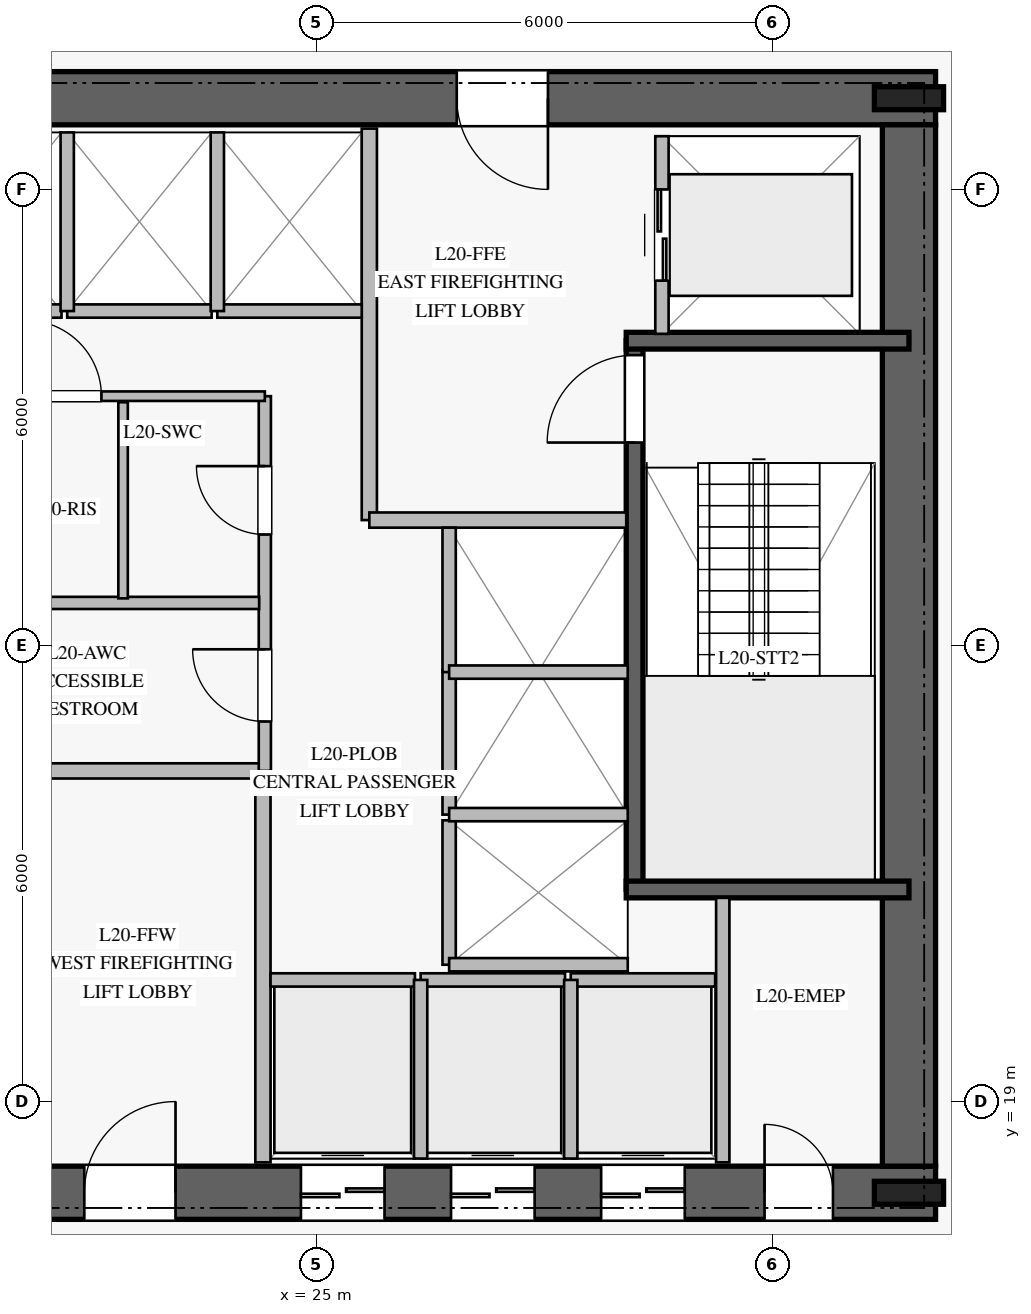
"""IFC4 building model, lengths in metres.
Left out: names, types, materials, properties, quantities, classifications, styles, units other than length and angle.
Written with IfcOpenShell. Run it as: python <this file> out.ifc"""

import sys

from ifc_helpers import new_model, si_unit, direction, frame, frame_2d, origin, origin_2d, place, context, subcontext, project, spatial, rectangle, i_section, extrude, element, fill, save


model = new_model("IFC4")
c1 = context("Model", 3, precision=1e-05, world=origin(), true_north=direction((0.0, 1.0)))
c2 = subcontext(c1, "Body", "Model", "MODEL_VIEW")
j1 = project(units=[si_unit("LENGTHUNIT", "METRE"), si_unit("PLANEANGLEUNIT", "RADIAN")], contexts=[c1])
p1 = place(None, origin())
s1 = spatial("IfcSite", under=j1, at=p1, CompositionType="ELEMENT")
p2 = place(p1, origin())
s2 = spatial("IfcBuilding", under=s1, at=p2, CompositionType="ELEMENT")
p3 = place(p2, frame((0.0, 0.0, 84.0)))
s3 = spatial("IfcBuildingStorey", under=s2, at=p3, CompositionType="ELEMENT", Elevation=84.0)
p4 = place(p3, frame((16.85, 17.8, 0.0), z_axis=(0.0, 0.0, 1.0), x_axis=(1.0, 0.0, 0.0)))
e1 = element("IfcWall", 1, at=p4, inside=s3, PredefinedType="SHEAR", context=c2, shape_type="SweptSolid", body=[
    extrude(rectangle(XDim=16.3, YDim=0.7, at=frame_2d((8.15, 0.0))), origin(), (0.0, 0.0, 1.0), 3.76),
])
p5 = place(p4, frame((5.1, 0.0, 0.0)))
e2 = element("IfcOpeningElement", 2, at=p5, cuts=e1, PredefinedType="OPENING", context=c2, shape_type="SweptSolid", body=[
    extrude(rectangle(XDim=1.2, YDim=2.25, at=frame_2d((0.6, 1.125))), frame((0.0, 0.36, 0.0), z_axis=(0.0, -1.0, 0.0), x_axis=(1.0, 0.0, 0.0)), (0.0, 0.0, 1.0), 0.72),
])
p6 = place(p4, frame((14.05, 0.0, 0.0)))
e3 = element("IfcOpeningElement", 3, at=p6, cuts=e1, PredefinedType="OPENING", context=c2, shape_type="SweptSolid", body=[
    extrude(rectangle(XDim=0.9, YDim=2.1, at=frame_2d((0.45, 1.05))), frame((0.0, 0.36, 0.0), z_axis=(0.0, -1.0, 0.0), x_axis=(1.0, 0.0, 0.0)), (0.0, 0.0, 1.0), 0.72),
])
p7 = place(p4, frame((7.95, 0.0, 0.0)))
e4 = element("IfcOpeningElement", 4, at=p7, cuts=e1, PredefinedType="OPENING", context=c2, shape_type="SweptSolid", body=[
    extrude(rectangle(XDim=1.1, YDim=2.2, at=frame_2d((0.55, 1.1))), frame((0.0, 0.36, 0.0), z_axis=(0.0, -1.0, 0.0), x_axis=(1.0, 0.0, 0.0)), (0.0, 0.0, 1.0), 0.72),
])
p8 = place(p4, frame((9.925, 0.0, 0.0)))
e5 = element("IfcOpeningElement", 5, at=p8, cuts=e1, PredefinedType="OPENING", context=c2, shape_type="SweptSolid", body=[
    extrude(rectangle(XDim=1.1, YDim=2.2, at=frame_2d((0.55, 1.1))), frame((0.0, 0.36, 0.0), z_axis=(0.0, -1.0, 0.0), x_axis=(1.0, 0.0, 0.0)), (0.0, 0.0, 1.0), 0.72),
])
p9 = place(p4, frame((11.9, 0.0, 0.0)))
e6 = element("IfcOpeningElement", 6, at=p9, cuts=e1, PredefinedType="OPENING", context=c2, shape_type="SweptSolid", body=[
    extrude(rectangle(XDim=1.1, YDim=2.2, at=frame_2d((0.55, 1.1))), frame((0.0, 0.36, 0.0), z_axis=(0.0, -1.0, 0.0), x_axis=(1.0, 0.0, 0.0)), (0.0, 0.0, 1.0), 0.72),
])
p10 = place(p3, frame((33.15, 32.2, 0.0), z_axis=(0.0, 0.0, 1.0), x_axis=(-1.0, 0.0, 0.0)))
e7 = element("IfcWall", 7, at=p10, inside=s3, PredefinedType="SHEAR", context=c2, shape_type="SweptSolid", body=[
    extrude(rectangle(XDim=16.3, YDim=0.7, at=frame_2d((8.15, 0.0))), origin(), (0.0, 0.0, 1.0), 3.76),
])
p11 = place(p10, frame((5.1, 0.0, 0.0)))
e8 = element("IfcOpeningElement", 8, at=p11, cuts=e7, PredefinedType="OPENING", context=c2, shape_type="SweptSolid", body=[
    extrude(rectangle(XDim=1.2, YDim=2.25, at=frame_2d((0.6, 1.125))), frame((0.0, 0.36, 0.0), z_axis=(0.0, -1.0, 0.0), x_axis=(1.0, 0.0, 0.0)), (0.0, 0.0, 1.0), 0.72),
])
p12 = place(p3, frame((32.8, 18.15, 0.0), z_axis=(0.0, 0.0, 1.0), x_axis=(0.0, 1.0, 0.0)))
e9 = element("IfcWall", 9, at=p12, inside=s3, PredefinedType="SHEAR", context=c2, shape_type="SweptSolid", body=[
    extrude(rectangle(XDim=13.7, YDim=0.7, at=frame_2d((6.85, 0.0))), origin(), (0.0, 0.0, 1.0), 3.76),
])
for number, where, z_axis, x_axis in (
    (10, (32.8, 17.8, 0.0), (0.0, 0.0, 1.0), (1.0, 0.0, 0.0)),
    (11, (32.8, 32.2, 0.0), (0.0, 0.0, 1.0), (1.0, 0.0, 0.0)),
):
    element("IfcColumn", number, at=place(p3, frame(where, z_axis=z_axis, x_axis=x_axis)), inside=s3, PredefinedType="COLUMN", context=c2, shape_type="SweptSolid", body=[
        extrude(i_section(OverallWidth=0.302, OverallDepth=0.91, WebThickness=0.021, FlangeThickness=0.04, at=origin_2d()), origin(), (0.0, 0.0, 1.0), 4.0),
    ])
p13 = place(p3, frame((29.19, 21.79, 0.0), z_axis=(0.0, 0.0, 1.0), x_axis=(0.0, 1.0, 0.0)))
e12 = element("IfcWall", 12, at=p13, inside=s3, PredefinedType="SOLIDWALL", context=c2, shape_type="SweptSolid", body=[
    extrude(rectangle(XDim=7.22, YDim=0.22, at=frame_2d((3.61, 0.0))), origin(), (0.0, 0.0, 1.0), 3.76),
])
p14 = place(p13, frame((5.88, 0.0, 0.0)))
e13 = element("IfcOpeningElement", 13, at=p14, cuts=e12, PredefinedType="OPENING", context=c2, shape_type="SweptSolid", body=[
    extrude(rectangle(XDim=1.15, YDim=2.2, at=frame_2d((0.575, 1.1))), frame((0.0, 0.12, 0.0), z_axis=(0.0, -1.0, 0.0), x_axis=(1.0, 0.0, 0.0)), (0.0, 0.0, 1.0), 0.24),
])
for number, where, z_axis, x_axis in (
    (14, (29.08, 21.79, 0.0), (0.0, 0.0, 1.0), (1.0, 0.0, 0.0)),
    (15, (29.08, 29.01, 0.0), (0.0, 0.0, 1.0), (1.0, 0.0, 0.0)),
):
    element("IfcWall", number, at=place(p3, frame(where, z_axis=z_axis, x_axis=x_axis)), inside=s3, PredefinedType="SOLIDWALL", context=c2, shape_type="SweptSolid", body=[
        extrude(rectangle(XDim=3.72, YDim=0.22, at=frame_2d((1.86, 0.0))), origin(), (0.0, 0.0, 1.0), 3.76),
    ])
p15 = place(p3, frame((24.3, 18.2, 0.0), z_axis=(0.0, 0.0, 1.0), x_axis=(0.0, 1.0, 0.0)))
e16 = element("IfcWall", 16, at=p15, inside=s3, PredefinedType="PARTITIONING", context=c2, shape_type="SweptSolid", body=[
    extrude(rectangle(XDim=5.15, YDim=0.2, at=frame_2d((2.575, 0.0))), origin(), (0.0, 0.0, 1.0), 3.76),
])
p16 = place(p3, frame((20.92, 23.35, 0.0), z_axis=(0.0, 0.0, 1.0), x_axis=(1.0, 0.0, 0.0)))
e17 = element("IfcWall", 17, at=p16, inside=s3, PredefinedType="PARTITIONING", context=c2, shape_type="SweptSolid", body=[
    extrude(rectangle(XDim=3.38, YDim=0.2, at=frame_2d((1.69, 0.0))), origin(), (0.0, 0.0, 1.0), 3.76),
])
p17 = place(p3, frame((25.7, 26.65, 0.0), z_axis=(0.0, 0.0, 1.0), x_axis=(0.0, 1.0, 0.0)))
e18 = element("IfcWall", 18, at=p17, inside=s3, PredefinedType="PARTITIONING", context=c2, shape_type="SweptSolid", body=[
    extrude(rectangle(XDim=5.15, YDim=0.2, at=frame_2d((2.575, 0.0))), origin(), (0.0, 0.0, 1.0), 3.76),
])
p18 = place(p3, frame((25.7, 26.65, 0.0), z_axis=(0.0, 0.0, 1.0), x_axis=(1.0, 0.0, 0.0)))
e19 = element("IfcWall", 19, at=p18, inside=s3, PredefinedType="PARTITIONING", context=c2, shape_type="SweptSolid", body=[
    extrude(rectangle(XDim=3.38, YDim=0.2, at=frame_2d((1.69, 0.0))), origin(), (0.0, 0.0, 1.0), 3.76),
])
p19 = place(p3, frame((24.325, 23.35, 0.0), z_axis=(0.0, 0.0, 1.0), x_axis=(0.0, 1.0, 0.0)))
e20 = element("IfcWall", 20, at=p19, inside=s3, PredefinedType="PLUMBINGWALL", context=c2, shape_type="SweptSolid", body=[
    extrude(rectangle(XDim=4.93, YDim=0.16, at=frame_2d((2.465, 0.0))), origin(), (0.0, 0.0, 1.0), 3.76),
])
p20 = place(p19, frame((0.65, 0.0, 0.0)))
e21 = element("IfcOpeningElement", 21, at=p20, cuts=e20, PredefinedType="OPENING", context=c2, shape_type="SweptSolid", body=[
    extrude(rectangle(XDim=0.95, YDim=2.1, at=frame_2d((0.475, 1.05))), frame((0.0, 0.09, 0.0), z_axis=(0.0, -1.0, 0.0), x_axis=(1.0, 0.0, 0.0)), (0.0, 0.0, 1.0), 0.18),
])
p21 = place(p19, frame((3.11, 0.0, 0.0)))
e22 = element("IfcOpeningElement", 22, at=p21, cuts=e20, PredefinedType="OPENING", context=c2, shape_type="SweptSolid", body=[
    extrude(rectangle(XDim=0.9, YDim=2.1, at=frame_2d((0.45, 1.05))), frame((0.0, 0.09, 0.0), z_axis=(0.0, -1.0, 0.0), x_axis=(1.0, 0.0, 0.0)), (0.0, 0.0, 1.0), 0.18),
])
p22 = place(p3, frame((20.92, 28.28, 0.0), z_axis=(0.0, 0.0, 1.0), x_axis=(1.0, 0.0, 0.0)))
e23 = element("IfcWall", 23, at=p22, inside=s3, PredefinedType="PARTITIONING", context=c2, shape_type="SweptSolid", body=[
    extrude(rectangle(XDim=3.405, YDim=0.125, at=frame_2d((1.703, 0.0))), origin(), (0.0, 0.0, 1.0), 3.76),
])
p23 = place(p22, frame((0.255, 0.0, 0.0)))
e24 = element("IfcOpeningElement", 24, at=p23, cuts=e23, PredefinedType="OPENING", context=c2, shape_type="SweptSolid", body=[
    extrude(rectangle(XDim=1.0, YDim=2.15, at=frame_2d((0.5, 1.075))), frame((0.0, 0.073, 0.0), z_axis=(0.0, -1.0, 0.0), x_axis=(1.0, 0.0, 0.0)), (0.0, 0.0, 1.0), 0.145),
])
p24 = place(p3, frame((20.95, 25.56, 0.0), z_axis=(0.0, 0.0, 1.0), x_axis=(1.0, 0.0, 0.0)))
e25 = element("IfcWall", 25, at=p24, inside=s3, PredefinedType="PLUMBINGWALL", context=c2, shape_type="SweptSolid", body=[
    extrude(rectangle(XDim=3.3, YDim=0.16, at=frame_2d((1.65, 0.0))), origin(), (0.0, 0.0, 1.0), 3.76),
])
p25 = place(p3, frame((22.46, 25.62, 0.0), z_axis=(0.0, 0.0, 1.0), x_axis=(0.0, 1.0, 0.0)))
e26 = element("IfcWall", 26, at=p25, inside=s3, PredefinedType="PARTITIONING", context=c2, shape_type="SweptSolid", body=[
    extrude(rectangle(XDim=2.58, YDim=0.125, at=frame_2d((1.29, 0.0))), origin(), (0.0, 0.0, 1.0), 3.76),
])
p26 = place(p3, frame((30.35, 18.2, 0.0), z_axis=(0.0, 0.0, 1.0), x_axis=(0.0, 1.0, 0.0)))
e27 = element("IfcWall", 27, at=p26, inside=s3, PredefinedType="PARTITIONING", context=c2, shape_type="SweptSolid", body=[
    extrude(rectangle(XDim=3.48, YDim=0.175, at=frame_2d((1.74, 0.0))), origin(), (0.0, 0.0, 1.0), 3.76),
])
p27 = place(p3, frame((24.4, 20.6, 0.0), z_axis=(0.0, 0.0, 1.0), x_axis=(1.0, 0.0, 0.0)))
e28 = element("IfcWall", 28, at=p27, inside=s3, PredefinedType="PARTITIONING", context=c2, shape_type="SweptSolid", body=[
    extrude(rectangle(XDim=1.9, YDim=0.175, at=frame_2d((0.95, 0.0))), origin(), (0.0, 0.0, 1.0), 3.76),
])
p28 = place(p3, frame((26.375, 20.6, 0.0), z_axis=(0.0, 0.0, 1.0), x_axis=(1.0, 0.0, 0.0)))
e29 = element("IfcWall", 29, at=p28, inside=s3, PredefinedType="PARTITIONING", context=c2, shape_type="SweptSolid", body=[
    extrude(rectangle(XDim=1.9, YDim=0.175, at=frame_2d((0.95, 0.0))), origin(), (0.0, 0.0, 1.0), 3.76),
])
p29 = place(p3, frame((26.375, 18.25, 0.0), z_axis=(0.0, 0.0, 1.0), x_axis=(0.0, 1.0, 0.0)))
e30 = element("IfcWall", 30, at=p29, inside=s3, PredefinedType="PARTITIONING", context=c2, shape_type="SweptSolid", body=[
    extrude(rectangle(XDim=2.35, YDim=0.175, at=frame_2d((1.175, 0.0))), origin(), (0.0, 0.0, 1.0), 3.76),
])
p30 = place(p3, frame((28.35, 20.6, 0.0), z_axis=(0.0, 0.0, 1.0), x_axis=(1.0, 0.0, 0.0)))
e31 = element("IfcWall", 31, at=p30, inside=s3, PredefinedType="PARTITIONING", context=c2, shape_type="SweptSolid", body=[
    extrude(rectangle(XDim=1.9, YDim=0.175, at=frame_2d((0.95, 0.0))), origin(), (0.0, 0.0, 1.0), 3.76),
])
p31 = place(p3, frame((28.35, 18.25, 0.0), z_axis=(0.0, 0.0, 1.0), x_axis=(0.0, 1.0, 0.0)))
e32 = element("IfcWall", 32, at=p31, inside=s3, PredefinedType="PARTITIONING", context=c2, shape_type="SweptSolid", body=[
    extrude(rectangle(XDim=2.35, YDim=0.175, at=frame_2d((1.175, 0.0))), origin(), (0.0, 0.0, 1.0), 3.76),
])
for number, where, z_axis, x_axis in (
    (33, (19.75, 29.4, 0.0), (0.0, 0.0, 1.0), (1.0, 0.0, 0.0)),
    (34, (21.725, 29.4, 0.0), (0.0, 0.0, 1.0), (1.0, 0.0, 0.0)),
):
    element("IfcWall", number, at=place(p3, frame(where, z_axis=z_axis, x_axis=x_axis)), inside=s3, PredefinedType="PARTITIONING", context=c2, shape_type="SweptSolid", body=[
        extrude(rectangle(XDim=1.9, YDim=0.175, at=frame_2d((0.95, 0.0))), origin(), (0.0, 0.0, 1.0), 3.76),
    ])
p32 = place(p3, frame((21.725, 29.4, 0.0), z_axis=(0.0, 0.0, 1.0), x_axis=(0.0, 1.0, 0.0)))
e35 = element("IfcWall", 35, at=p32, inside=s3, PredefinedType="PARTITIONING", context=c2, shape_type="SweptSolid", body=[
    extrude(rectangle(XDim=2.35, YDim=0.175, at=frame_2d((1.175, 0.0))), origin(), (0.0, 0.0, 1.0), 3.76),
])
p33 = place(p3, frame((23.7, 29.4, 0.0), z_axis=(0.0, 0.0, 1.0), x_axis=(1.0, 0.0, 0.0)))
e36 = element("IfcWall", 36, at=p33, inside=s3, PredefinedType="PARTITIONING", context=c2, shape_type="SweptSolid", body=[
    extrude(rectangle(XDim=1.9, YDim=0.175, at=frame_2d((0.95, 0.0))), origin(), (0.0, 0.0, 1.0), 3.76),
])
p34 = place(p3, frame((23.7, 29.4, 0.0), z_axis=(0.0, 0.0, 1.0), x_axis=(0.0, 1.0, 0.0)))
e37 = element("IfcWall", 37, at=p34, inside=s3, PredefinedType="PARTITIONING", context=c2, shape_type="SweptSolid", body=[
    extrude(rectangle(XDim=2.35, YDim=0.175, at=frame_2d((1.175, 0.0))), origin(), (0.0, 0.0, 1.0), 3.76),
])
p35 = place(p3, frame((26.75, 20.8, 0.0), z_axis=(0.0, 0.0, 1.0), x_axis=(0.0, 1.0, 0.0)))
e38 = element("IfcWall", 38, at=p35, inside=s3, PredefinedType="PARTITIONING", context=c2, shape_type="SweptSolid", body=[
    extrude(rectangle(XDim=1.9, YDim=0.175, at=frame_2d((0.95, 0.0))), origin(), (0.0, 0.0, 1.0), 3.76),
])
p36 = place(p3, frame((26.75, 20.8, 0.0), z_axis=(0.0, 0.0, 1.0), x_axis=(1.0, 0.0, 0.0)))
e39 = element("IfcWall", 39, at=p36, inside=s3, PredefinedType="PARTITIONING", context=c2, shape_type="SweptSolid", body=[
    extrude(rectangle(XDim=2.35, YDim=0.175, at=frame_2d((1.175, 0.0))), origin(), (0.0, 0.0, 1.0), 3.76),
])
p37 = place(p3, frame((26.75, 22.775, 0.0), z_axis=(0.0, 0.0, 1.0), x_axis=(0.0, 1.0, 0.0)))
e40 = element("IfcWall", 40, at=p37, inside=s3, PredefinedType="PARTITIONING", context=c2, shape_type="SweptSolid", body=[
    extrude(rectangle(XDim=1.9, YDim=0.175, at=frame_2d((0.95, 0.0))), origin(), (0.0, 0.0, 1.0), 3.76),
])
p38 = place(p3, frame((26.75, 22.775, 0.0), z_axis=(0.0, 0.0, 1.0), x_axis=(1.0, 0.0, 0.0)))
e41 = element("IfcWall", 41, at=p38, inside=s3, PredefinedType="PARTITIONING", context=c2, shape_type="SweptSolid", body=[
    extrude(rectangle(XDim=2.35, YDim=0.175, at=frame_2d((1.175, 0.0))), origin(), (0.0, 0.0, 1.0), 3.76),
])
p39 = place(p3, frame((26.75, 24.65, 0.0), z_axis=(0.0, 0.0, 1.0), x_axis=(0.0, 1.0, 0.0)))
e42 = element("IfcWall", 42, at=p39, inside=s3, PredefinedType="PARTITIONING", context=c2, shape_type="SweptSolid", body=[
    extrude(rectangle(XDim=1.9, YDim=0.175, at=frame_2d((0.95, 0.0))), origin(), (0.0, 0.0, 1.0), 3.76),
])
p40 = place(p3, frame((26.75, 24.65, 0.0), z_axis=(0.0, 0.0, 1.0), x_axis=(1.0, 0.0, 0.0)))
e43 = element("IfcWall", 43, at=p40, inside=s3, PredefinedType="PARTITIONING", context=c2, shape_type="SweptSolid", body=[
    extrude(rectangle(XDim=2.35, YDim=0.175, at=frame_2d((1.175, 0.0))), origin(), (0.0, 0.0, 1.0), 3.76),
])
p41 = place(p3, frame((29.55, 29.1, 0.0), z_axis=(0.0, 0.0, 1.0), x_axis=(0.0, 1.0, 0.0)))
e44 = element("IfcWall", 44, at=p41, inside=s3, PredefinedType="PARTITIONING", context=c2, shape_type="SweptSolid", body=[
    extrude(rectangle(XDim=2.6, YDim=0.175, at=frame_2d((1.3, 0.0))), origin(), (0.0, 0.0, 1.0), 3.76),
])
p42 = place(p41, frame((0.7, 0.0, 0.0)))
e45 = element("IfcOpeningElement", 45, at=p42, cuts=e44, PredefinedType="OPENING", context=c2, shape_type="SweptSolid", body=[
    extrude(rectangle(XDim=1.2, YDim=2.2, at=frame_2d((0.6, 1.1))), frame((0.0, 0.098, 0.0), z_axis=(0.0, -1.0, 0.0), x_axis=(1.0, 0.0, 0.0)), (0.0, 0.0, 1.0), 0.195),
])
p43 = place(p14, origin())
e46 = element("IfcDoor", 46, at=p43, inside=s3, OperationType="SINGLE_SWING_LEFT", PredefinedType="DOOR", context=c2, shape_type="SweptSolid", body=[
    extrude(rectangle(XDim=1.15, YDim=2.2, at=frame_2d((0.575, 1.1))), frame((0.0, 0.025, 0.0), z_axis=(0.0, -1.0, 0.0), x_axis=(1.0, 0.0, 0.0)), (0.0, 0.0, 1.0), 0.05),
])
fill(e13, e46)
p44 = place(p5, origin())
e47 = element("IfcDoor", 47, at=p44, inside=s3, OperationType="SINGLE_SWING_RIGHT", PredefinedType="DOOR", context=c2, shape_type="SweptSolid", body=[
    extrude(rectangle(XDim=1.2, YDim=2.25, at=frame_2d((0.6, 1.125))), frame((0.0, 0.025, 0.0), z_axis=(0.0, -1.0, 0.0), x_axis=(1.0, 0.0, 0.0)), (0.0, 0.0, 1.0), 0.05),
])
fill(e2, e47)
p45 = place(p11, origin())
e48 = element("IfcDoor", 48, at=p45, inside=s3, OperationType="SINGLE_SWING_LEFT", PredefinedType="DOOR", context=c2, shape_type="SweptSolid", body=[
    extrude(rectangle(XDim=1.2, YDim=2.25, at=frame_2d((0.6, 1.125))), frame((0.0, 0.025, 0.0), z_axis=(0.0, -1.0, 0.0), x_axis=(1.0, 0.0, 0.0)), (0.0, 0.0, 1.0), 0.05),
])
fill(e8, e48)
p46 = place(p20, origin())
e49 = element("IfcDoor", 49, at=p46, inside=s3, OperationType="SINGLE_SWING_RIGHT", PredefinedType="DOOR", context=c2, shape_type="SweptSolid", body=[
    extrude(rectangle(XDim=0.95, YDim=2.1, at=frame_2d((0.475, 1.05))), frame((0.0, 0.025, 0.0), z_axis=(0.0, -1.0, 0.0), x_axis=(1.0, 0.0, 0.0)), (0.0, 0.0, 1.0), 0.05),
])
fill(e21, e49)
p47 = place(p23, origin())
e50 = element("IfcDoor", 50, at=p47, inside=s3, OperationType="SINGLE_SWING_LEFT", PredefinedType="DOOR", context=c2, shape_type="SweptSolid", body=[
    extrude(rectangle(XDim=1.0, YDim=2.15, at=frame_2d((0.5, 1.075))), frame((0.0, 0.025, 0.0), z_axis=(0.0, -1.0, 0.0), x_axis=(1.0, 0.0, 0.0)), (0.0, 0.0, 1.0), 0.05),
])
fill(e24, e50)
p48 = place(p21, origin())
e51 = element("IfcDoor", 51, at=p48, inside=s3, OperationType="SINGLE_SWING_RIGHT", PredefinedType="DOOR", context=c2, shape_type="SweptSolid", body=[
    extrude(rectangle(XDim=0.9, YDim=2.1, at=frame_2d((0.45, 1.05))), frame((0.0, 0.025, 0.0), z_axis=(0.0, -1.0, 0.0), x_axis=(1.0, 0.0, 0.0)), (0.0, 0.0, 1.0), 0.05),
])
fill(e22, e51)
p49 = place(p6, origin())
e52 = element("IfcDoor", 52, at=p49, inside=s3, OperationType="SINGLE_SWING_LEFT", PredefinedType="DOOR", context=c2, shape_type="SweptSolid", body=[
    extrude(rectangle(XDim=0.9, YDim=2.1, at=frame_2d((0.45, 1.05))), frame((0.0, 0.025, 0.0), z_axis=(0.0, -1.0, 0.0), x_axis=(1.0, 0.0, 0.0)), (0.0, 0.0, 1.0), 0.05),
])
fill(e3, e52)
p50 = place(p7, origin())
e53 = element("IfcDoor", 53, at=p50, inside=s3, OperationType="DOUBLE_DOOR_SLIDING", PredefinedType="DOOR", context=c2, shape_type="SweptSolid", body=[
    extrude(rectangle(XDim=1.1, YDim=2.2, at=frame_2d((0.55, 1.1))), frame((0.0, 0.025, 0.0), z_axis=(0.0, -1.0, 0.0), x_axis=(1.0, 0.0, 0.0)), (0.0, 0.0, 1.0), 0.05),
])
fill(e4, e53)
p51 = place(p8, origin())
e54 = element("IfcDoor", 54, at=p51, inside=s3, OperationType="DOUBLE_DOOR_SLIDING", PredefinedType="DOOR", context=c2, shape_type="SweptSolid", body=[
    extrude(rectangle(XDim=1.1, YDim=2.2, at=frame_2d((0.55, 1.1))), frame((0.0, 0.025, 0.0), z_axis=(0.0, -1.0, 0.0), x_axis=(1.0, 0.0, 0.0)), (0.0, 0.0, 1.0), 0.05),
])
fill(e5, e54)
p52 = place(p9, origin())
e55 = element("IfcDoor", 55, at=p52, inside=s3, OperationType="DOUBLE_DOOR_SLIDING", PredefinedType="DOOR", context=c2, shape_type="SweptSolid", body=[
    extrude(rectangle(XDim=1.1, YDim=2.2, at=frame_2d((0.55, 1.1))), frame((0.0, 0.025, 0.0), z_axis=(0.0, -1.0, 0.0), x_axis=(1.0, 0.0, 0.0)), (0.0, 0.0, 1.0), 0.05),
])
fill(e6, e55)
p53 = place(p42, origin())
e56 = element("IfcDoor", 56, at=p53, inside=s3, OperationType="DOUBLE_DOOR_SLIDING", PredefinedType="DOOR", context=c2, shape_type="SweptSolid", body=[
    extrude(rectangle(XDim=1.2, YDim=2.2, at=frame_2d((0.6, 1.1))), frame((0.0, 0.025, 0.0), z_axis=(0.0, -1.0, 0.0), x_axis=(1.0, 0.0, 0.0)), (0.0, 0.0, 1.0), 0.05),
])
fill(e45, e56)
save(model, sys.argv[1])
